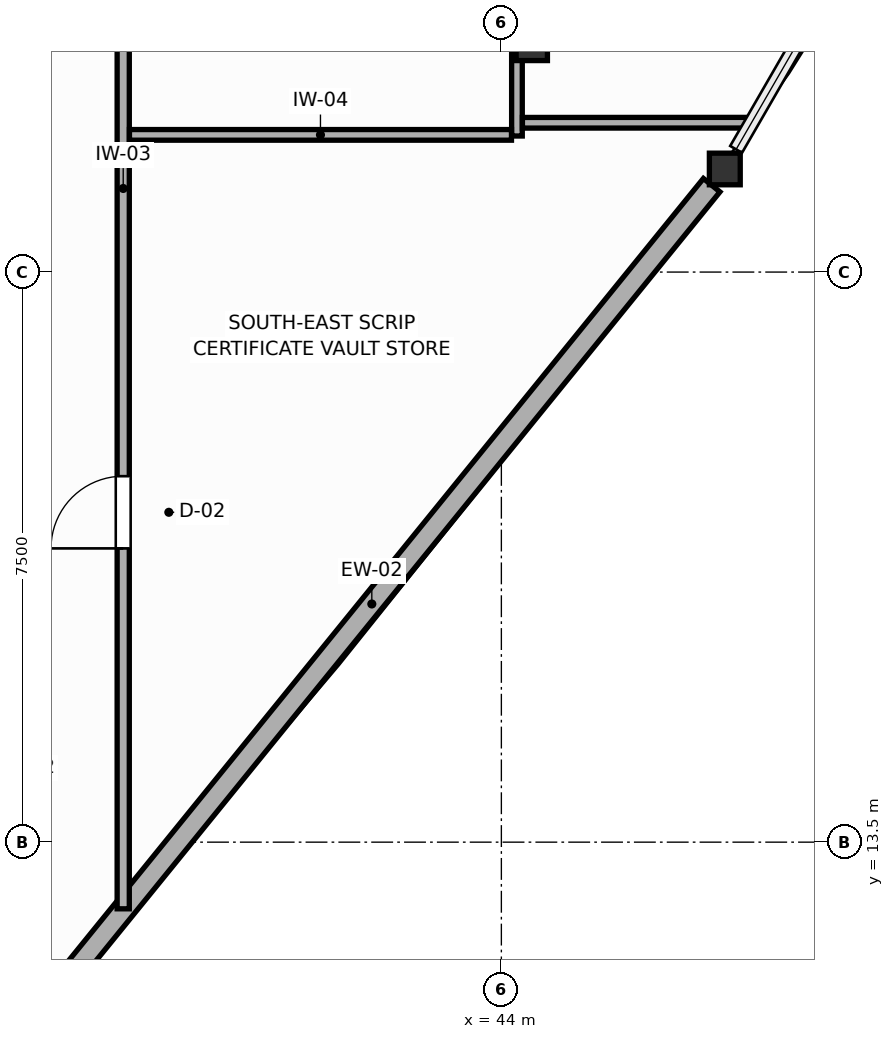
"""IFC4 building model, lengths in metres.
Left out: names, types, materials, properties, quantities, classifications, styles, units other than length and angle.
Written with IfcOpenShell. Run it as: python <this file> out.ifc"""

import sys

from ifc_helpers import new_model, si_unit, direction, frame, frame_2d, origin, origin_2d, place, context, subcontext, project, spatial, rectangle, i_section, extrude, source, transform, mapped, element, fill, save


model = new_model("IFC4")
c1 = context("Model", 3, precision=1e-05, world=origin(), true_north=direction((0.0, 1.0)))
c2 = subcontext(c1, "Body", "Model", "MODEL_VIEW")
j1 = project(units=[si_unit("LENGTHUNIT", "METRE"), si_unit("PLANEANGLEUNIT", "RADIAN")], contexts=[c1])
p1 = place(None, origin())
s1 = spatial("IfcSite", under=j1, at=p1, CompositionType="ELEMENT")
p2 = place(p1, origin())
s2 = spatial("IfcBuilding", under=s1, at=p2, CompositionType="ELEMENT")
p3 = place(p2, frame((0.0, 0.0, 175.8)))
s3 = spatial("IfcBuildingStorey", under=s2, at=p3, CompositionType="ELEMENT", Elevation=175.8)
m1 = source(origin(), c2, "Body", "SweptSolid", [
    extrude(i_section(OverallWidth=0.412, OverallDepth=0.435, WebThickness=0.033, FlangeThickness=0.053, FilletRadius=0.015, at=origin_2d()), origin(), (0.0, 0.0, 1.0), 3.6),
])
p4 = place(p3, frame((44.4, 24.0, 0.0), z_axis=(0.0, 0.0, 1.0), x_axis=(1.0, 0.0, 0.0)))
e1 = element("IfcColumn", 1, at=p4, inside=s3, PredefinedType="COLUMN", context=c2, shape_type="MappedRepresentation", body=[
    mapped(m1, transform((0.0, 0.0, 0.0), scale=1.0)),
])
m2 = source(origin(), c2, "Body", "SweptSolid", [
    extrude(i_section(OverallWidth=0.406, OverallDepth=0.416, WebThickness=0.027, FlangeThickness=0.044, FilletRadius=0.015, at=origin_2d()), origin(), (0.0, 0.0, 1.0), 3.6),
])
p5 = place(p3, frame((46.94, 22.356, 0.0), z_axis=(0.0, 0.0, 1.0), x_axis=(1.0, 0.0, 0.0)))
e2 = element("IfcColumn", 2, at=p5, inside=s3, PredefinedType="COLUMN", context=c2, shape_type="MappedRepresentation", body=[
    mapped(m2, transform((0.0, 0.0, 0.0), scale=1.0)),
])
p6 = place(p3, frame((37.824, 11.124, 0.0), z_axis=(0.0, 0.0, 1.0), x_axis=(0.63011778054, 0.776499570281, 0.0)))
e3 = element("IfcWall", 3, at=p6, inside=s3, PredefinedType="SOLIDWALL", context=c2, shape_type="SweptSolid", body=[
    extrude(rectangle(XDim=14.192, YDim=0.28, at=frame_2d((7.096, 0.0))), origin(), (0.0, 0.0, 1.0), 1.87),
])
p7 = place(p3, frame((39.025, 12.623, 0.0), z_axis=(0.0, 0.0, 1.0), x_axis=(0.0, 1.0, 0.0)))
e4 = element("IfcWall", 4, at=p7, inside=s3, PredefinedType="PARTITIONING", context=c2, shape_type="SweptSolid", body=[
    extrude(rectangle(XDim=17.407, YDim=0.16, at=frame_2d((8.704, 0.0))), origin(), (0.0, 0.0, 1.0), 3.4),
])
p8 = place(p7, frame((4.742, 0.0, 0.0)))
e5 = element("IfcOpeningElement", 5, at=p8, cuts=e4, PredefinedType="OPENING", context=c2, shape_type="SweptSolid", body=[
    extrude(rectangle(XDim=0.95, YDim=2.05, at=frame_2d((0.475, 1.025))), frame((0.0, 0.09, 0.0), z_axis=(0.0, -1.0, 0.0), x_axis=(1.0, 0.0, 0.0)), (0.0, 0.0, 1.0), 0.18),
])
p9 = place(p7, frame((13.262, 0.0, 0.0)))
e6 = element("IfcOpeningElement", 6, at=p9, cuts=e4, PredefinedType="OPENING", context=c2, shape_type="SweptSolid", body=[
    extrude(rectangle(XDim=0.95, YDim=2.05, at=frame_2d((0.475, 1.025))), frame((0.0, 0.09, 0.0), z_axis=(0.0, -1.0, 0.0), x_axis=(1.0, 0.0, 0.0)), (0.0, 0.0, 1.0), 0.18),
])
p10 = place(p3, frame((44.205, 22.79, 0.0), z_axis=(0.0, 0.0, 1.0), x_axis=(0.0, 1.0, 0.0)))
e7 = element("IfcWall", 7, at=p10, inside=s3, PredefinedType="PARTITIONING", context=c2, shape_type="SweptSolid", body=[
    extrude(rectangle(XDim=7.153, YDim=0.14, at=frame_2d((3.577, 0.0))), origin(), (0.0, 0.0, 1.0), 2.16),
])
p11 = place(p10, frame((4.235, 0.0, 0.0)))
e8 = element("IfcOpeningElement", 8, at=p11, cuts=e7, PredefinedType="OPENING", context=c2, shape_type="SweptSolid", body=[
    extrude(rectangle(XDim=0.95, YDim=2.05, at=frame_2d((0.475, 1.025))), frame((0.0, 0.08, 0.0), z_axis=(0.0, -1.0, 0.0), x_axis=(1.0, 0.0, 0.0)), (0.0, 0.0, 1.0), 0.16),
])
p12 = place(p3, frame((39.107, 22.805, 0.0), z_axis=(0.0, 0.0, 1.0), x_axis=(1.0, 0.0, 0.0)))
e9 = element("IfcWall", 9, at=p12, inside=s3, PredefinedType="PARTITIONING", context=c2, shape_type="SweptSolid", body=[
    extrude(rectangle(XDim=5.026, YDim=0.14, at=frame_2d((2.513, 0.0))), origin(), (0.0, 0.0, 1.0), 3.4),
])
p13 = place(p3, frame((44.277, 22.964, 0.0), z_axis=(0.0, 0.0, 1.0), x_axis=(0.999999946802, 0.00032618444, 0.0)))
e10 = element("IfcWall", 10, at=p13, inside=s3, PredefinedType="PARTITIONING", context=c2, shape_type="SweptSolid", body=[
    extrude(rectangle(XDim=2.994, YDim=0.14, at=frame_2d((1.497, 0.0))), origin(), (0.0, 0.0, 1.0), 3.4),
])
p14 = place(p8, origin())
e11 = element("IfcDoor", 11, at=p14, inside=s3, OperationType="SINGLE_SWING_LEFT", PredefinedType="DOOR", context=c2, shape_type="SweptSolid", body=[
    extrude(rectangle(XDim=0.95, YDim=2.05, at=frame_2d((0.475, 1.025))), frame((0.0, 0.025, 0.0), z_axis=(0.0, -1.0, 0.0), x_axis=(1.0, 0.0, 0.0)), (0.0, 0.0, 1.0), 0.05),
])
fill(e5, e11)
save(model, sys.argv[1])
